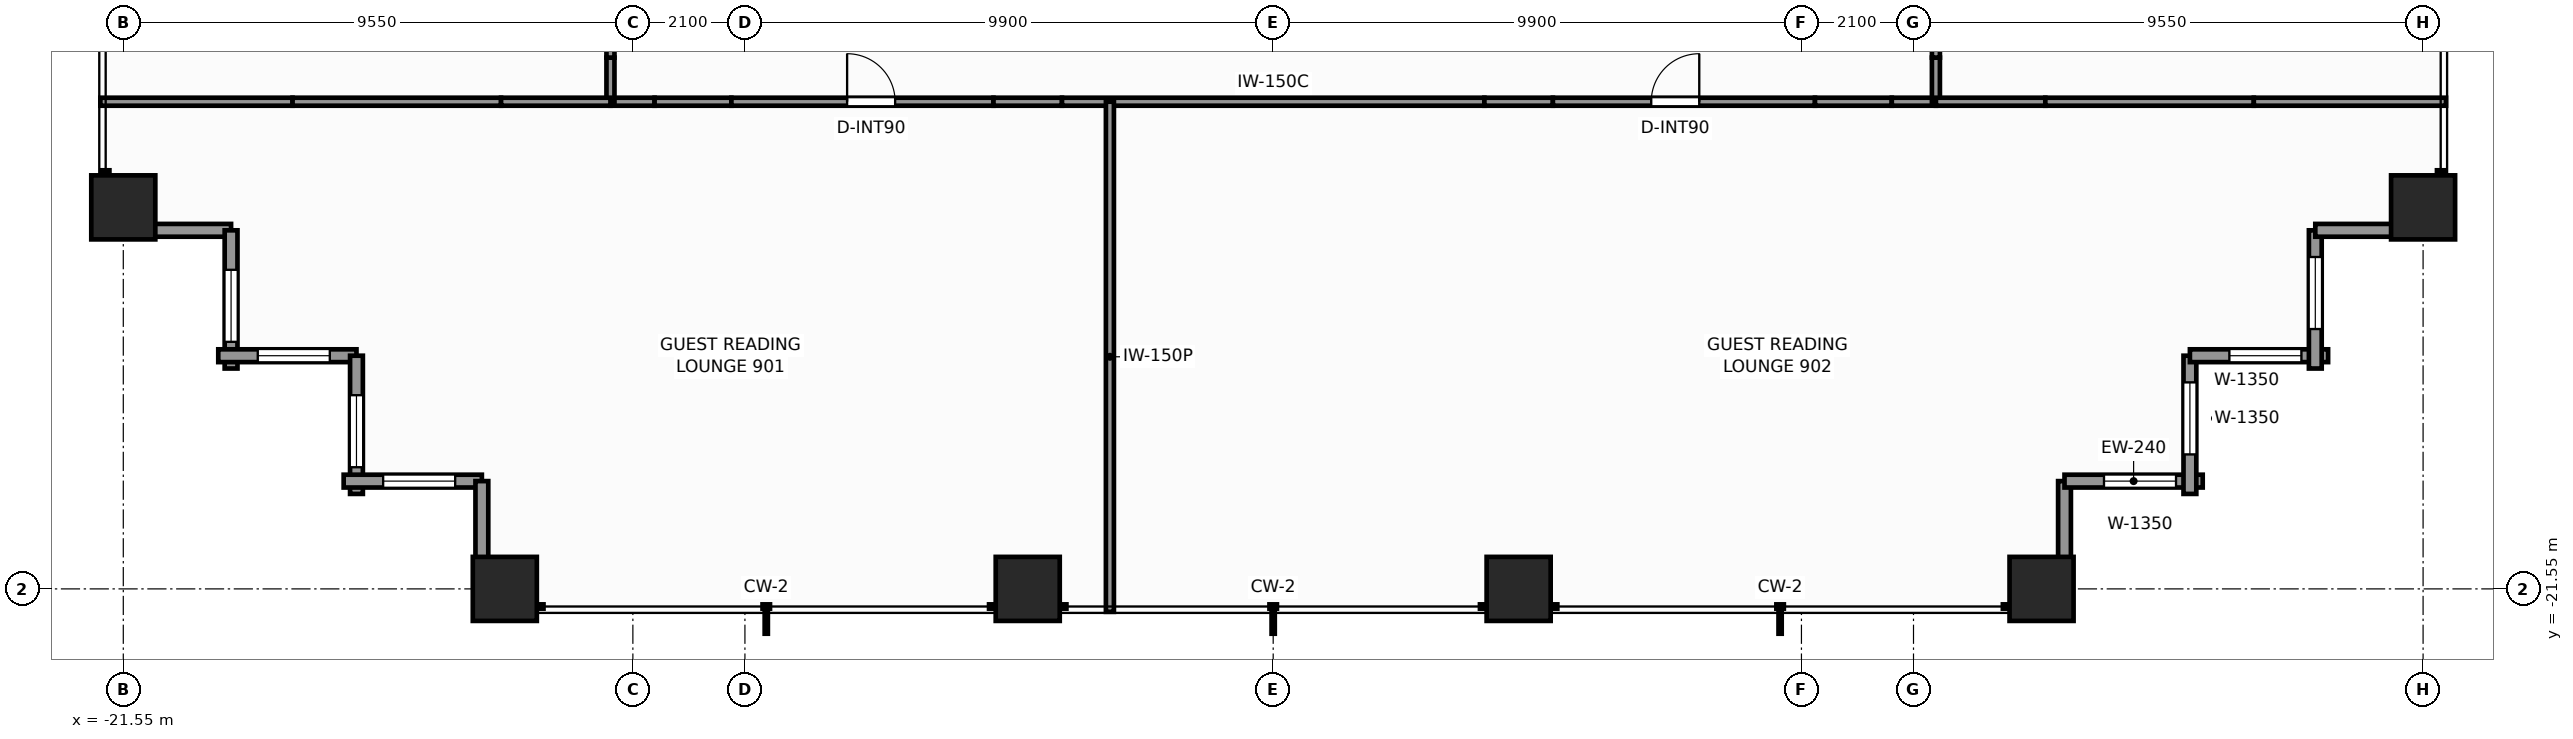
"""IFC4 building model, lengths in metres.
Left out: names, types, materials, properties, quantities, classifications, styles, units other than length and angle.
Written with IfcOpenShell. Run it as: python <this file> out.ifc"""

import sys

from ifc_helpers import new_model, si_unit, direction, frame, frame_2d, origin, origin_2d, place, context, subcontext, project, spatial, rectangle, extrude, element, fill, save


model = new_model("IFC4")
c1 = context("Model", 3, precision=1e-05, world=origin(), true_north=direction((0.0, 1.0)))
c2 = subcontext(c1, "Body", "Model", "MODEL_VIEW")
j1 = project(units=[si_unit("LENGTHUNIT", "METRE"), si_unit("PLANEANGLEUNIT", "RADIAN")], contexts=[c1])
p1 = place(None, origin())
s1 = spatial("IfcSite", under=j1, at=p1, CompositionType="ELEMENT")
p2 = place(p1, origin())
s2 = spatial("IfcBuilding", under=s1, at=p2, CompositionType="ELEMENT")
p3 = place(p2, frame((0.0, 0.0, 33.7)))
s3 = spatial("IfcBuildingStorey", under=s2, at=p3, CompositionType="ELEMENT", Elevation=33.7)
for number, where, z_axis, x_axis in (
    (1, (-14.4, -21.55, 0.0), (0.0, 0.0, 1.0), (1.0, 0.0, 0.0)),
    (2, (-4.6, -21.55, 0.0), (0.0, 0.0, 1.0), (1.0, 0.0, 0.0)),
    (3, (4.6, -21.55, 0.0), (0.0, 0.0, 1.0), (1.0, 0.0, 0.0)),
    (4, (14.4, -21.55, 0.0), (0.0, 0.0, 1.0), (1.0, 0.0, 0.0)),
    (5, (-21.55, -14.4, 0.0), (0.0, 0.0, 1.0), (1.0, 0.0, 0.0)),
    (6, (21.55, -14.4, 0.0), (0.0, 0.0, 1.0), (1.0, 0.0, 0.0)),
):
    element("IfcColumn", number, at=place(p3, frame(where, z_axis=z_axis, x_axis=x_axis)), inside=s3, PredefinedType="COLUMN", context=c2, shape_type="SweptSolid", body=[
        extrude(rectangle(XDim=1.2, YDim=1.2, at=origin_2d()), origin(), (0.0, 0.0, 1.0), 3.3),
    ])
p4 = place(p3, frame((14.83, -19.53, 0.0), z_axis=(0.0, 0.0, 1.0), x_axis=(0.0, -1.0, 0.0)))
e7 = element("IfcWall", 7, at=p4, inside=s3, PredefinedType="STANDARD", context=c2, shape_type="SweptSolid", body=[
    extrude(rectangle(XDim=2.59, YDim=0.24, at=frame_2d((1.295, 0.0))), origin(), (0.0, 0.0, 1.0), 1.955),
])
p5 = place(p3, frame((17.42, -19.53, 0.0), z_axis=(0.0, 0.0, 1.0), x_axis=(-1.0, 0.0, 0.0)))
e8 = element("IfcWall", 8, at=p5, inside=s3, PredefinedType="STANDARD", context=c2, shape_type="SweptSolid", body=[
    extrude(rectangle(XDim=2.59, YDim=0.24, at=frame_2d((1.295, 0.0))), origin(), (0.0, 0.0, 1.0), 2.439),
])
p6 = place(p5, frame((0.5, 0.0, 0.65)))
e9 = element("IfcOpeningElement", 9, at=p6, cuts=e8, PredefinedType="OPENING", context=c2, shape_type="SweptSolid", body=[
    extrude(rectangle(XDim=1.35, YDim=1.55, at=frame_2d((0.675, 0.775))), frame((0.0, 0.13, 0.0), z_axis=(0.0, -1.0, 0.0), x_axis=(1.0, 0.0, 0.0)), (0.0, 0.0, 1.0), 0.26),
])
p7 = place(p3, frame((17.18, -17.18, 0.0), z_axis=(0.0, 0.0, 1.0), x_axis=(0.0, -1.0, 0.0)))
e10 = element("IfcWall", 10, at=p7, inside=s3, PredefinedType="STANDARD", context=c2, shape_type="SweptSolid", body=[
    extrude(rectangle(XDim=2.59, YDim=0.24, at=frame_2d((1.295, 0.0))), origin(), (0.0, 0.0, 1.0), 2.439),
])
p8 = place(p7, frame((0.5, 0.0, 0.65)))
e11 = element("IfcOpeningElement", 11, at=p8, cuts=e10, PredefinedType="OPENING", context=c2, shape_type="SweptSolid", body=[
    extrude(rectangle(XDim=1.35, YDim=1.55, at=frame_2d((0.675, 0.775))), frame((0.0, 0.13, 0.0), z_axis=(0.0, -1.0, 0.0), x_axis=(1.0, 0.0, 0.0)), (0.0, 0.0, 1.0), 0.26),
])
p9 = place(p3, frame((19.77, -17.18, 0.0), z_axis=(0.0, 0.0, 1.0), x_axis=(-1.0, 0.0, 0.0)))
e12 = element("IfcWall", 12, at=p9, inside=s3, PredefinedType="STANDARD", context=c2, shape_type="SweptSolid", body=[
    extrude(rectangle(XDim=2.59, YDim=0.24, at=frame_2d((1.295, 0.0))), origin(), (0.0, 0.0, 1.0), 2.439),
])
p10 = place(p9, frame((0.5, 0.0, 0.65)))
e13 = element("IfcOpeningElement", 13, at=p10, cuts=e12, PredefinedType="OPENING", context=c2, shape_type="SweptSolid", body=[
    extrude(rectangle(XDim=1.35, YDim=1.55, at=frame_2d((0.675, 0.775))), frame((0.0, 0.13, 0.0), z_axis=(0.0, -1.0, 0.0), x_axis=(1.0, 0.0, 0.0)), (0.0, 0.0, 1.0), 0.26),
])
p11 = place(p3, frame((19.53, -14.83, 0.0), z_axis=(0.0, 0.0, 1.0), x_axis=(0.0, -1.0, 0.0)))
e14 = element("IfcWall", 14, at=p11, inside=s3, PredefinedType="STANDARD", context=c2, shape_type="SweptSolid", body=[
    extrude(rectangle(XDim=2.59, YDim=0.24, at=frame_2d((1.295, 0.0))), origin(), (0.0, 0.0, 1.0), 2.439),
])
p12 = place(p11, frame((0.5, 0.0, 0.65)))
e15 = element("IfcOpeningElement", 15, at=p12, cuts=e14, PredefinedType="OPENING", context=c2, shape_type="SweptSolid", body=[
    extrude(rectangle(XDim=1.35, YDim=1.55, at=frame_2d((0.675, 0.775))), frame((0.0, 0.13, 0.0), z_axis=(0.0, -1.0, 0.0), x_axis=(1.0, 0.0, 0.0)), (0.0, 0.0, 1.0), 0.26),
])
for number, where, z_axis, x_axis in (
    (16, (22.12, -14.83, 0.0), (0.0, 0.0, 1.0), (-1.0, 0.0, 0.0)),
    (17, (-19.53, -14.83, 0.0), (0.0, 0.0, 1.0), (-1.0, 0.0, 0.0)),
):
    element("IfcWall", number, at=place(p3, frame(where, z_axis=z_axis, x_axis=x_axis)), inside=s3, PredefinedType="STANDARD", context=c2, shape_type="SweptSolid", body=[
        extrude(rectangle(XDim=2.59, YDim=0.24, at=frame_2d((1.295, 0.0))), origin(), (0.0, 0.0, 1.0), 1.955),
    ])
p13 = place(p3, frame((-19.53, -17.42, 0.0), z_axis=(0.0, 0.0, 1.0), x_axis=(0.0, 1.0, 0.0)))
e18 = element("IfcWall", 18, at=p13, inside=s3, PredefinedType="STANDARD", context=c2, shape_type="SweptSolid", body=[
    extrude(rectangle(XDim=2.59, YDim=0.24, at=frame_2d((1.295, 0.0))), origin(), (0.0, 0.0, 1.0), 2.439),
])
p14 = place(p13, frame((0.5, 0.0, 0.65)))
e19 = element("IfcOpeningElement", 19, at=p14, cuts=e18, PredefinedType="OPENING", context=c2, shape_type="SweptSolid", body=[
    extrude(rectangle(XDim=1.35, YDim=1.55, at=frame_2d((0.675, 0.775))), frame((0.0, 0.13, 0.0), z_axis=(0.0, -1.0, 0.0), x_axis=(1.0, 0.0, 0.0)), (0.0, 0.0, 1.0), 0.26),
])
p15 = place(p3, frame((-17.18, -17.18, 0.0), z_axis=(0.0, 0.0, 1.0), x_axis=(-1.0, 0.0, 0.0)))
e20 = element("IfcWall", 20, at=p15, inside=s3, PredefinedType="STANDARD", context=c2, shape_type="SweptSolid", body=[
    extrude(rectangle(XDim=2.59, YDim=0.24, at=frame_2d((1.295, 0.0))), origin(), (0.0, 0.0, 1.0), 2.439),
])
p16 = place(p15, frame((0.5, 0.0, 0.65)))
e21 = element("IfcOpeningElement", 21, at=p16, cuts=e20, PredefinedType="OPENING", context=c2, shape_type="SweptSolid", body=[
    extrude(rectangle(XDim=1.35, YDim=1.55, at=frame_2d((0.675, 0.775))), frame((0.0, 0.13, 0.0), z_axis=(0.0, -1.0, 0.0), x_axis=(1.0, 0.0, 0.0)), (0.0, 0.0, 1.0), 0.26),
])
p17 = place(p3, frame((-17.18, -19.77, 0.0), z_axis=(0.0, 0.0, 1.0), x_axis=(0.0, 1.0, 0.0)))
e22 = element("IfcWall", 22, at=p17, inside=s3, PredefinedType="STANDARD", context=c2, shape_type="SweptSolid", body=[
    extrude(rectangle(XDim=2.59, YDim=0.24, at=frame_2d((1.295, 0.0))), origin(), (0.0, 0.0, 1.0), 2.439),
])
p18 = place(p17, frame((0.5, 0.0, 0.65)))
e23 = element("IfcOpeningElement", 23, at=p18, cuts=e22, PredefinedType="OPENING", context=c2, shape_type="SweptSolid", body=[
    extrude(rectangle(XDim=1.35, YDim=1.55, at=frame_2d((0.675, 0.775))), frame((0.0, 0.13, 0.0), z_axis=(0.0, -1.0, 0.0), x_axis=(1.0, 0.0, 0.0)), (0.0, 0.0, 1.0), 0.26),
])
p19 = place(p3, frame((-14.83, -19.53, 0.0), z_axis=(0.0, 0.0, 1.0), x_axis=(-1.0, 0.0, 0.0)))
e24 = element("IfcWall", 24, at=p19, inside=s3, PredefinedType="STANDARD", context=c2, shape_type="SweptSolid", body=[
    extrude(rectangle(XDim=2.59, YDim=0.24, at=frame_2d((1.295, 0.0))), origin(), (0.0, 0.0, 1.0), 2.439),
])
p20 = place(p19, frame((0.5, 0.0, 0.65)))
e25 = element("IfcOpeningElement", 25, at=p20, cuts=e24, PredefinedType="OPENING", context=c2, shape_type="SweptSolid", body=[
    extrude(rectangle(XDim=1.35, YDim=1.55, at=frame_2d((0.675, 0.775))), frame((0.0, 0.13, 0.0), z_axis=(0.0, -1.0, 0.0), x_axis=(1.0, 0.0, 0.0)), (0.0, 0.0, 1.0), 0.26),
])
p21 = place(p3, frame((-14.83, -22.12, 0.0), z_axis=(0.0, 0.0, 1.0), x_axis=(0.0, 1.0, 0.0)))
e26 = element("IfcWall", 26, at=p21, inside=s3, PredefinedType="STANDARD", context=c2, shape_type="SweptSolid", body=[
    extrude(rectangle(XDim=2.59, YDim=0.24, at=frame_2d((1.295, 0.0))), origin(), (0.0, 0.0, 1.0), 1.955),
])
p22 = place(p3, frame((-12.42, -12.42, 0.0), z_axis=(0.0, 0.0, 1.0), x_axis=(1.0, 0.0, 0.0)))
e27 = element("IfcWall", 27, at=p22, inside=s3, PredefinedType="PARTITIONING", context=c2, shape_type="SweptSolid", body=[
    extrude(rectangle(XDim=0.827, YDim=0.15, at=frame_2d((0.414, 0.0))), origin(), (0.0, 0.0, 1.0), 3.06),
])
p23 = place(p3, frame((-11.593, -12.42, 0.0), z_axis=(0.0, 0.0, 1.0), x_axis=(1.0, 0.0, 0.0)))
e28 = element("IfcWall", 28, at=p23, inside=s3, PredefinedType="PARTITIONING", context=c2, shape_type="SweptSolid", body=[
    extrude(rectangle(XDim=1.439, YDim=0.15, at=frame_2d((0.72, 0.0))), origin(), (0.0, 0.0, 1.0), 1.945),
])
p24 = place(p3, frame((-10.154, -12.42, 0.0), z_axis=(0.0, 0.0, 1.0), x_axis=(1.0, 0.0, 0.0)))
e29 = element("IfcWall", 29, at=p24, inside=s3, PredefinedType="PARTITIONING", context=c2, shape_type="SweptSolid", body=[
    extrude(rectangle(XDim=4.912, YDim=0.15, at=frame_2d((2.456, 0.0))), origin(), (0.0, 0.0, 1.0), 3.06),
])
p25 = place(p24, frame((2.169, 0.0, 0.0)))
e30 = element("IfcOpeningElement", 30, at=p25, cuts=e29, PredefinedType="OPENING", context=c2, shape_type="SweptSolid", body=[
    extrude(rectangle(XDim=0.9, YDim=2.06, at=frame_2d((0.45, 1.03))), frame((0.0, 0.085, 0.0), z_axis=(0.0, -1.0, 0.0), x_axis=(1.0, 0.0, 0.0)), (0.0, 0.0, 1.0), 0.17),
])
p26 = place(p3, frame((-5.242, -12.42, 0.0), z_axis=(0.0, 0.0, 1.0), x_axis=(1.0, 0.0, 0.0)))
e31 = element("IfcWall", 31, at=p26, inside=s3, PredefinedType="PARTITIONING", context=c2, shape_type="SweptSolid", body=[
    extrude(rectangle(XDim=1.284, YDim=0.15, at=frame_2d((0.642, 0.0))), origin(), (0.0, 0.0, 1.0), 1.945),
])
p27 = place(p3, frame((-3.958, -12.42, 0.0), z_axis=(0.0, 0.0, 1.0), x_axis=(1.0, 0.0, 0.0)))
e32 = element("IfcWall", 32, at=p27, inside=s3, PredefinedType="PARTITIONING", context=c2, shape_type="SweptSolid", body=[
    extrude(rectangle(XDim=7.916, YDim=0.15, at=frame_2d((3.958, 0.0))), origin(), (0.0, 0.0, 1.0), 2.349),
])
p28 = place(p3, frame((3.958, -12.42, 0.0), z_axis=(0.0, 0.0, 1.0), x_axis=(1.0, 0.0, 0.0)))
e33 = element("IfcWall", 33, at=p28, inside=s3, PredefinedType="PARTITIONING", context=c2, shape_type="SweptSolid", body=[
    extrude(rectangle(XDim=1.284, YDim=0.15, at=frame_2d((0.642, 0.0))), origin(), (0.0, 0.0, 1.0), 1.945),
])
p29 = place(p3, frame((5.242, -12.42, 0.0), z_axis=(0.0, 0.0, 1.0), x_axis=(1.0, 0.0, 0.0)))
e34 = element("IfcWall", 34, at=p29, inside=s3, PredefinedType="PARTITIONING", context=c2, shape_type="SweptSolid", body=[
    extrude(rectangle(XDim=4.912, YDim=0.15, at=frame_2d((2.456, 0.0))), origin(), (0.0, 0.0, 1.0), 3.06),
])
p30 = place(p29, frame((1.843, 0.0, 0.0)))
e35 = element("IfcOpeningElement", 35, at=p30, cuts=e34, PredefinedType="OPENING", context=c2, shape_type="SweptSolid", body=[
    extrude(rectangle(XDim=0.9, YDim=2.06, at=frame_2d((0.45, 1.03))), frame((0.0, 0.085, 0.0), z_axis=(0.0, -1.0, 0.0), x_axis=(1.0, 0.0, 0.0)), (0.0, 0.0, 1.0), 0.17),
])
p31 = place(p3, frame((10.154, -12.42, 0.0), z_axis=(0.0, 0.0, 1.0), x_axis=(1.0, 0.0, 0.0)))
e36 = element("IfcWall", 36, at=p31, inside=s3, PredefinedType="PARTITIONING", context=c2, shape_type="SweptSolid", body=[
    extrude(rectangle(XDim=1.439, YDim=0.15, at=frame_2d((0.72, 0.0))), origin(), (0.0, 0.0, 1.0), 1.945),
])
for number, where, z_axis, x_axis in (
    (37, (11.593, -12.42, 0.0), (0.0, 0.0, 1.0), (1.0, 0.0, 0.0)),
    (38, (-12.42, -12.42, 0.0), (0.0, 0.0, 1.0), (0.0, 1.0, 0.0)),
):
    element("IfcWall", number, at=place(p3, frame(where, z_axis=z_axis, x_axis=x_axis)), inside=s3, PredefinedType="PARTITIONING", context=c2, shape_type="SweptSolid", body=[
        extrude(rectangle(XDim=0.827, YDim=0.15, at=frame_2d((0.414, 0.0))), origin(), (0.0, 0.0, 1.0), 3.06),
    ])
p32 = place(p3, frame((-12.42, -11.593, 0.0), z_axis=(0.0, 0.0, 1.0), x_axis=(0.0, 1.0, 0.0)))
e39 = element("IfcWall", 39, at=p32, inside=s3, PredefinedType="PARTITIONING", context=c2, shape_type="SweptSolid", body=[
    extrude(rectangle(XDim=1.439, YDim=0.15, at=frame_2d((0.72, 0.0))), origin(), (0.0, 0.0, 1.0), 1.945),
])
p33 = place(p3, frame((12.42, -12.42, 0.0), z_axis=(0.0, 0.0, 1.0), x_axis=(0.0, 1.0, 0.0)))
e40 = element("IfcWall", 40, at=p33, inside=s3, PredefinedType="PARTITIONING", context=c2, shape_type="SweptSolid", body=[
    extrude(rectangle(XDim=0.827, YDim=0.15, at=frame_2d((0.414, 0.0))), origin(), (0.0, 0.0, 1.0), 3.06),
])
p34 = place(p3, frame((12.42, -11.593, 0.0), z_axis=(0.0, 0.0, 1.0), x_axis=(0.0, 1.0, 0.0)))
e41 = element("IfcWall", 41, at=p34, inside=s3, PredefinedType="PARTITIONING", context=c2, shape_type="SweptSolid", body=[
    extrude(rectangle(XDim=1.439, YDim=0.15, at=frame_2d((0.72, 0.0))), origin(), (0.0, 0.0, 1.0), 1.945),
])
p35 = place(p3, frame((-21.98, -12.42, 0.0), z_axis=(0.0, 0.0, 1.0), x_axis=(1.0, 0.0, 0.0)))
e42 = element("IfcWall", 42, at=p35, inside=s3, PredefinedType="PARTITIONING", context=c2, shape_type="SweptSolid", body=[
    extrude(rectangle(XDim=3.602, YDim=0.15, at=frame_2d((1.801, 0.0))), origin(), (0.0, 0.0, 1.0), 2.429),
])
p36 = place(p3, frame((-18.378, -12.42, 0.0), z_axis=(0.0, 0.0, 1.0), x_axis=(1.0, 0.0, 0.0)))
e43 = element("IfcWall", 43, at=p36, inside=s3, PredefinedType="PARTITIONING", context=c2, shape_type="SweptSolid", body=[
    extrude(rectangle(XDim=3.907, YDim=0.15, at=frame_2d((1.954, 0.0))), origin(), (0.0, 0.0, 1.0), 1.945),
])
for number, where, z_axis, x_axis in (
    (44, (-14.47, -12.42, 0.0), (0.0, 0.0, 1.0), (1.0, 0.0, 0.0)),
    (45, (12.42, -12.42, 0.0), (0.0, 0.0, 1.0), (1.0, 0.0, 0.0)),
):
    element("IfcWall", number, at=place(p3, frame(where, z_axis=z_axis, x_axis=x_axis)), inside=s3, PredefinedType="PARTITIONING", context=c2, shape_type="SweptSolid", body=[
        extrude(rectangle(XDim=2.05, YDim=0.15, at=frame_2d((1.025, 0.0))), origin(), (0.0, 0.0, 1.0), 3.06),
    ])
p37 = place(p3, frame((14.47, -12.42, 0.0), z_axis=(0.0, 0.0, 1.0), x_axis=(1.0, 0.0, 0.0)))
e46 = element("IfcWall", 46, at=p37, inside=s3, PredefinedType="PARTITIONING", context=c2, shape_type="SweptSolid", body=[
    extrude(rectangle(XDim=3.907, YDim=0.15, at=frame_2d((1.954, 0.0))), origin(), (0.0, 0.0, 1.0), 1.945),
])
p38 = place(p3, frame((18.378, -12.42, 0.0), z_axis=(0.0, 0.0, 1.0), x_axis=(1.0, 0.0, 0.0)))
e47 = element("IfcWall", 47, at=p38, inside=s3, PredefinedType="PARTITIONING", context=c2, shape_type="SweptSolid", body=[
    extrude(rectangle(XDim=3.602, YDim=0.15, at=frame_2d((1.801, 0.0))), origin(), (0.0, 0.0, 1.0), 2.429),
])
p39 = place(p3, frame((-3.06, -21.98, 0.0), z_axis=(0.0, 0.0, 1.0), x_axis=(0.0, 1.0, 0.0)))
e48 = element("IfcWall", 48, at=p39, inside=s3, PredefinedType="PARTITIONING", context=c2, shape_type="SweptSolid", body=[
    extrude(rectangle(XDim=9.56, YDim=0.15, at=frame_2d((4.78, 0.0))), origin(), (0.0, 0.0, 1.0), 2.349),
])
p40 = place(p6, origin())
e49 = element("IfcWindow", 49, at=p40, inside=s3, PartitioningType="SINGLE_PANEL", PredefinedType="WINDOW", context=c2, shape_type="SweptSolid", body=[
    extrude(rectangle(XDim=1.35, YDim=1.55, at=frame_2d((0.675, 0.775))), frame((0.0, 0.03, 0.0), z_axis=(0.0, -1.0, 0.0), x_axis=(1.0, 0.0, 0.0)), (0.0, 0.0, 1.0), 0.06),
])
fill(e9, e49)
p41 = place(p8, origin())
e50 = element("IfcWindow", 50, at=p41, inside=s3, PartitioningType="SINGLE_PANEL", PredefinedType="WINDOW", context=c2, shape_type="SweptSolid", body=[
    extrude(rectangle(XDim=1.35, YDim=1.55, at=frame_2d((0.675, 0.775))), frame((0.0, 0.03, 0.0), z_axis=(0.0, -1.0, 0.0), x_axis=(1.0, 0.0, 0.0)), (0.0, 0.0, 1.0), 0.06),
])
fill(e11, e50)
p42 = place(p10, origin())
e51 = element("IfcWindow", 51, at=p42, inside=s3, PartitioningType="SINGLE_PANEL", PredefinedType="WINDOW", context=c2, shape_type="SweptSolid", body=[
    extrude(rectangle(XDim=1.35, YDim=1.55, at=frame_2d((0.675, 0.775))), frame((0.0, 0.03, 0.0), z_axis=(0.0, -1.0, 0.0), x_axis=(1.0, 0.0, 0.0)), (0.0, 0.0, 1.0), 0.06),
])
fill(e13, e51)
p43 = place(p12, origin())
e52 = element("IfcWindow", 52, at=p43, inside=s3, PartitioningType="SINGLE_PANEL", PredefinedType="WINDOW", context=c2, shape_type="SweptSolid", body=[
    extrude(rectangle(XDim=1.35, YDim=1.55, at=frame_2d((0.675, 0.775))), frame((0.0, 0.03, 0.0), z_axis=(0.0, -1.0, 0.0), x_axis=(1.0, 0.0, 0.0)), (0.0, 0.0, 1.0), 0.06),
])
fill(e15, e52)
p44 = place(p14, origin())
e53 = element("IfcWindow", 53, at=p44, inside=s3, PartitioningType="SINGLE_PANEL", PredefinedType="WINDOW", context=c2, shape_type="SweptSolid", body=[
    extrude(rectangle(XDim=1.35, YDim=1.55, at=frame_2d((0.675, 0.775))), frame((0.0, 0.03, 0.0), z_axis=(0.0, -1.0, 0.0), x_axis=(1.0, 0.0, 0.0)), (0.0, 0.0, 1.0), 0.06),
])
fill(e19, e53)
p45 = place(p16, origin())
e54 = element("IfcWindow", 54, at=p45, inside=s3, PartitioningType="SINGLE_PANEL", PredefinedType="WINDOW", context=c2, shape_type="SweptSolid", body=[
    extrude(rectangle(XDim=1.35, YDim=1.55, at=frame_2d((0.675, 0.775))), frame((0.0, 0.03, 0.0), z_axis=(0.0, -1.0, 0.0), x_axis=(1.0, 0.0, 0.0)), (0.0, 0.0, 1.0), 0.06),
])
fill(e21, e54)
p46 = place(p18, origin())
e55 = element("IfcWindow", 55, at=p46, inside=s3, PartitioningType="SINGLE_PANEL", PredefinedType="WINDOW", context=c2, shape_type="SweptSolid", body=[
    extrude(rectangle(XDim=1.35, YDim=1.55, at=frame_2d((0.675, 0.775))), frame((0.0, 0.03, 0.0), z_axis=(0.0, -1.0, 0.0), x_axis=(1.0, 0.0, 0.0)), (0.0, 0.0, 1.0), 0.06),
])
fill(e23, e55)
p47 = place(p20, origin())
e56 = element("IfcWindow", 56, at=p47, inside=s3, PartitioningType="SINGLE_PANEL", PredefinedType="WINDOW", context=c2, shape_type="SweptSolid", body=[
    extrude(rectangle(XDim=1.35, YDim=1.55, at=frame_2d((0.675, 0.775))), frame((0.0, 0.03, 0.0), z_axis=(0.0, -1.0, 0.0), x_axis=(1.0, 0.0, 0.0)), (0.0, 0.0, 1.0), 0.06),
])
fill(e25, e56)
p48 = place(p25, origin())
e57 = element("IfcDoor", 57, at=p48, inside=s3, OperationType="SINGLE_SWING_LEFT", PredefinedType="DOOR", context=c2, shape_type="SweptSolid", body=[
    extrude(rectangle(XDim=0.9, YDim=2.06, at=frame_2d((0.45, 1.03))), frame((0.0, 0.025, 0.0), z_axis=(0.0, -1.0, 0.0), x_axis=(1.0, 0.0, 0.0)), (0.0, 0.0, 1.0), 0.05),
])
fill(e30, e57)
p49 = place(p30, origin())
e58 = element("IfcDoor", 58, at=p49, inside=s3, OperationType="SINGLE_SWING_RIGHT", PredefinedType="DOOR", context=c2, shape_type="SweptSolid", body=[
    extrude(rectangle(XDim=0.9, YDim=2.06, at=frame_2d((0.45, 1.03))), frame((0.0, 0.025, 0.0), z_axis=(0.0, -1.0, 0.0), x_axis=(1.0, 0.0, 0.0)), (0.0, 0.0, 1.0), 0.05),
])
fill(e35, e58)
save(model, sys.argv[1])
